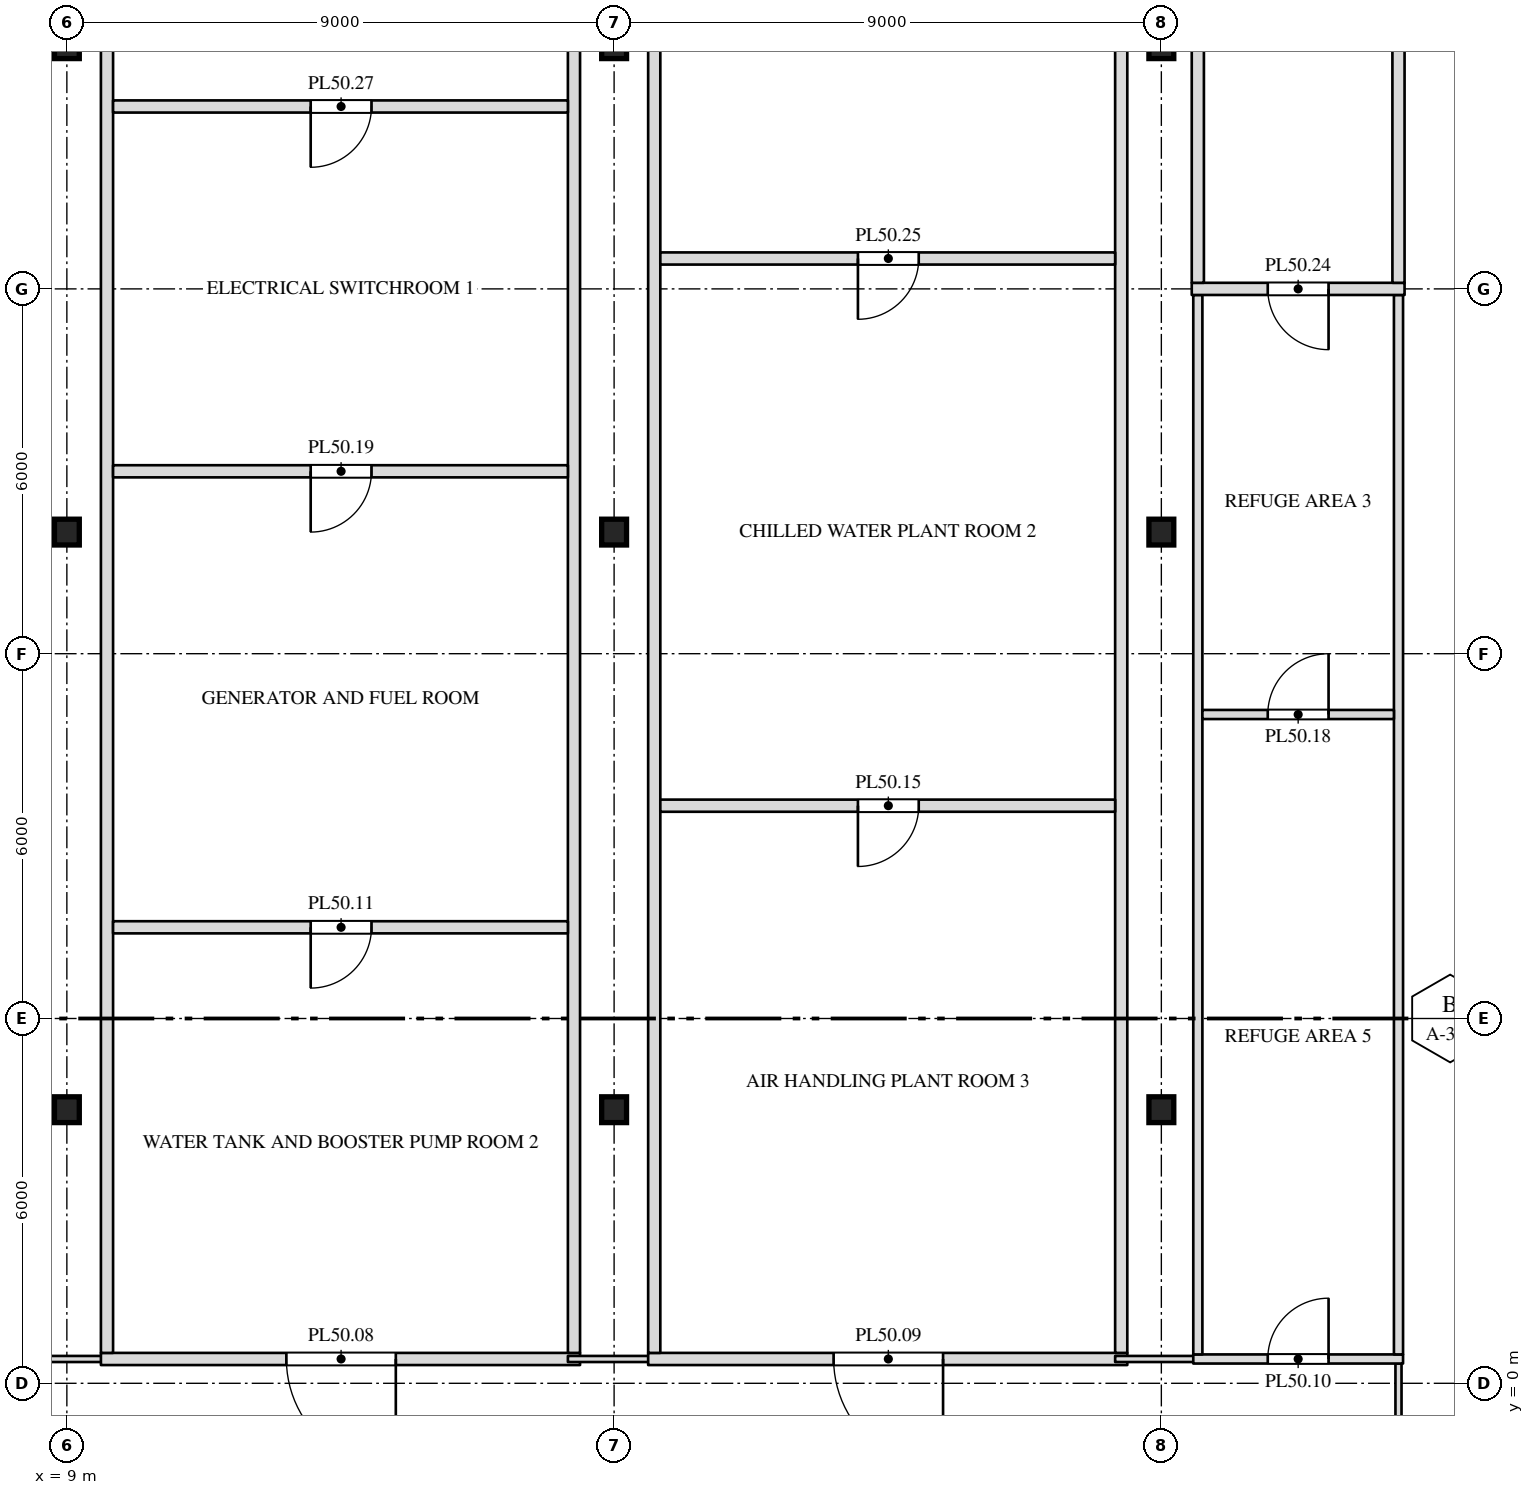
"""IFC4 building model, lengths in metres.
Left out: names, types, materials, properties, quantities, classifications, styles, units other than length and angle.
Written with IfcOpenShell. Run it as: python <this file> out.ifc"""

import sys

from ifc_helpers import new_model, si_unit, direction, frame, frame_2d, origin, origin_2d, place, context, subcontext, project, spatial, rectangle, i_section, extrude, element, fill, save


model = new_model("IFC4")
c1 = context("Model", 3, precision=1e-05, world=origin(), true_north=direction((0.0, 1.0)))
c2 = subcontext(c1, "Body", "Model", "MODEL_VIEW")
j1 = project(units=[si_unit("LENGTHUNIT", "METRE"), si_unit("PLANEANGLEUNIT", "RADIAN")], contexts=[c1])
p1 = place(None, origin())
s1 = spatial("IfcSite", under=j1, at=p1, CompositionType="ELEMENT")
p2 = place(p1, origin())
s2 = spatial("IfcBuilding", under=s1, at=p2, CompositionType="ELEMENT")
p3 = place(p2, frame((0.0, 0.0, 216.5)))
s3 = spatial("IfcBuildingStorey", under=s2, at=p3, CompositionType="ELEMENT", Elevation=216.5)
for number, where, z_axis, x_axis in (
    (1, (9.0, 4.5, 0.0), (0.0, 0.0, 1.0), (1.0, 0.0, 0.0)),
    (2, (18.0, 4.5, 0.0), (0.0, 0.0, 1.0), (1.0, 0.0, 0.0)),
    (3, (27.0, 4.5, 0.0), (0.0, 0.0, 1.0), (1.0, 0.0, 0.0)),
    (4, (9.0, 14.0, 0.0), (0.0, 0.0, 1.0), (1.0, 0.0, 0.0)),
    (5, (18.0, 14.0, 0.0), (0.0, 0.0, 1.0), (1.0, 0.0, 0.0)),
    (6, (27.0, 14.0, 0.0), (0.0, 0.0, 1.0), (1.0, 0.0, 0.0)),
    (7, (9.0, 22.0, 0.0), (0.0, 0.0, 1.0), (1.0, 0.0, 0.0)),
    (8, (18.0, 22.0, 0.0), (0.0, 0.0, 1.0), (1.0, 0.0, 0.0)),
    (9, (27.0, 22.0, 0.0), (0.0, 0.0, 1.0), (1.0, 0.0, 0.0)),
):
    element("IfcColumn", number, at=place(p3, frame(where, z_axis=z_axis, x_axis=x_axis)), inside=s3, PredefinedType="COLUMN", context=c2, shape_type="SweptSolid", body=[
        extrude(i_section(OverallWidth=0.409, OverallDepth=0.424, WebThickness=0.033, FlangeThickness=0.052, at=origin_2d()), origin(), (0.0, 0.0, 1.0), 4.0),
    ])
p4 = place(p3, frame((30.9, -1.925, 0.0), z_axis=(0.0, 0.0, 1.0), x_axis=(0.0, 1.0, 0.0)))
e10 = element("IfcWall", 10, at=p4, inside=s3, PredefinedType="PARTITIONING", context=c2, shape_type="SweptSolid", body=[
    extrude(rectangle(XDim=2.25, YDim=0.1, at=frame_2d((1.125, 0.0))), origin(), (0.0, 0.0, 1.0), 3.8),
])
p5 = place(p3, frame((8.24, 0.4, 0.0), z_axis=(0.0, 0.0, 1.0), x_axis=(1.0, 0.0, 0.0)))
e11 = element("IfcWall", 11, at=p5, inside=s3, PredefinedType="PARTITIONING", context=c2, shape_type="SweptSolid", body=[
    extrude(rectangle(XDim=1.52, YDim=0.1, at=frame_2d((0.76, 0.0))), origin(), (0.0, 0.0, 1.0), 3.8),
])
p6 = place(p3, frame((9.56, 0.4, 0.0), z_axis=(0.0, 0.0, 1.0), x_axis=(1.0, 0.0, 0.0)))
e12 = element("IfcWall", 12, at=p6, inside=s3, PredefinedType="PARTITIONING", context=c2, shape_type="SweptSolid", body=[
    extrude(rectangle(XDim=7.88, YDim=0.2, at=frame_2d((3.94, 0.0))), origin(), (0.0, 0.0, 1.0), 3.8),
])
p7 = place(p6, frame((3.05, 0.0, 0.0)))
e13 = element("IfcOpeningElement", 13, at=p7, cuts=e12, PredefinedType="OPENING", context=c2, shape_type="SweptSolid", body=[
    extrude(rectangle(XDim=1.8, YDim=2.1, at=frame_2d((0.9, 1.05))), frame((0.0, 0.112, 0.0), z_axis=(0.0, -1.0, 0.0), x_axis=(1.0, 0.0, 0.0)), (0.0, 0.0, 1.0), 0.224),
])
p8 = place(p3, frame((9.66, 0.5, 0.0), z_axis=(0.0, 0.0, 1.0), x_axis=(0.0, 1.0, 0.0)))
e14 = element("IfcWall", 14, at=p8, inside=s3, PredefinedType="PARTITIONING", context=c2, shape_type="SweptSolid", body=[
    extrude(rectangle(XDim=28.5, YDim=0.2, at=frame_2d((14.25, 0.0))), origin(), (0.0, 0.0, 1.0), 3.8),
])
p9 = place(p3, frame((17.24, 0.4, 0.0), z_axis=(0.0, 0.0, 1.0), x_axis=(1.0, 0.0, 0.0)))
e15 = element("IfcWall", 15, at=p9, inside=s3, PredefinedType="PARTITIONING", context=c2, shape_type="SweptSolid", body=[
    extrude(rectangle(XDim=1.52, YDim=0.1, at=frame_2d((0.76, 0.0))), origin(), (0.0, 0.0, 1.0), 3.8),
])
p10 = place(p3, frame((17.34, 0.5, 0.0), z_axis=(0.0, 0.0, 1.0), x_axis=(0.0, 1.0, 0.0)))
e16 = element("IfcWall", 16, at=p10, inside=s3, PredefinedType="PARTITIONING", context=c2, shape_type="SweptSolid", body=[
    extrude(rectangle(XDim=28.496, YDim=0.2, at=frame_2d((14.248, 0.0))), origin(), (0.0, 0.0, 1.0), 3.8),
])
p11 = place(p3, frame((18.56, 0.4, 0.0), z_axis=(0.0, 0.0, 1.0), x_axis=(1.0, 0.0, 0.0)))
e17 = element("IfcWall", 17, at=p11, inside=s3, PredefinedType="PARTITIONING", context=c2, shape_type="SweptSolid", body=[
    extrude(rectangle(XDim=7.88, YDim=0.2, at=frame_2d((3.94, 0.0))), origin(), (0.0, 0.0, 1.0), 3.8),
])
p12 = place(p11, frame((3.05, 0.0, 0.0)))
e18 = element("IfcOpeningElement", 18, at=p12, cuts=e17, PredefinedType="OPENING", context=c2, shape_type="SweptSolid", body=[
    extrude(rectangle(XDim=1.8, YDim=2.1, at=frame_2d((0.9, 1.05))), frame((0.0, 0.112, 0.0), z_axis=(0.0, -1.0, 0.0), x_axis=(1.0, 0.0, 0.0)), (0.0, 0.0, 1.0), 0.224),
])
p13 = place(p3, frame((18.66, 0.5, 0.0), z_axis=(0.0, 0.0, 1.0), x_axis=(0.0, 1.0, 0.0)))
e19 = element("IfcWall", 19, at=p13, inside=s3, PredefinedType="PARTITIONING", context=c2, shape_type="SweptSolid", body=[
    extrude(rectangle(XDim=28.496, YDim=0.2, at=frame_2d((14.248, 0.0))), origin(), (0.0, 0.0, 1.0), 3.8),
])
p14 = place(p3, frame((26.24, 0.4, 0.0), z_axis=(0.0, 0.0, 1.0), x_axis=(1.0, 0.0, 0.0)))
e20 = element("IfcWall", 20, at=p14, inside=s3, PredefinedType="PARTITIONING", context=c2, shape_type="SweptSolid", body=[
    extrude(rectangle(XDim=1.435, YDim=0.1, at=frame_2d((0.718, 0.0))), origin(), (0.0, 0.0, 1.0), 3.8),
])
p15 = place(p3, frame((26.34, 0.5, 0.0), z_axis=(0.0, 0.0, 1.0), x_axis=(0.0, 1.0, 0.0)))
e21 = element("IfcWall", 21, at=p15, inside=s3, PredefinedType="PARTITIONING", context=c2, shape_type="SweptSolid", body=[
    extrude(rectangle(XDim=28.5, YDim=0.2, at=frame_2d((14.25, 0.0))), origin(), (0.0, 0.0, 1.0), 3.8),
])
p16 = place(p3, frame((27.525, 0.4, 0.0), z_axis=(0.0, 0.0, 1.0), x_axis=(1.0, 0.0, 0.0)))
e22 = element("IfcWall", 22, at=p16, inside=s3, PredefinedType="PARTITIONING", context=c2, shape_type="SweptSolid", body=[
    extrude(rectangle(XDim=3.45, YDim=0.15, at=frame_2d((1.725, 0.0))), origin(), (0.0, 0.0, 1.0), 3.8),
])
p17 = place(p16, frame((1.225, 0.0, 0.0)))
e23 = element("IfcOpeningElement", 23, at=p17, cuts=e22, PredefinedType="OPENING", context=c2, shape_type="SweptSolid", body=[
    extrude(rectangle(XDim=1.0, YDim=2.1, at=frame_2d((0.5, 1.05))), frame((0.0, 0.087, 0.0), z_axis=(0.0, -1.0, 0.0), x_axis=(1.0, 0.0, 0.0)), (0.0, 0.0, 1.0), 0.174),
])
for number, where, z_axis, x_axis in (
    (24, (27.6, 0.475, 0.0), (0.0, 0.0, 1.0), (0.0, 1.0, 0.0)),
    (25, (30.9, 0.475, 0.0), (0.0, 0.0, 1.0), (0.0, 1.0, 0.0)),
):
    element("IfcWall", number, at=place(p3, frame(where, z_axis=z_axis, x_axis=x_axis)), inside=s3, PredefinedType="PARTITIONING", context=c2, shape_type="SweptSolid", body=[
        extrude(rectangle(XDim=17.425, YDim=0.15, at=frame_2d((8.712, 0.0))), origin(), (0.0, 0.0, 1.0), 3.8),
    ])
p18 = place(p3, frame((9.76, 7.5, 0.0), z_axis=(0.0, 0.0, 1.0), x_axis=(1.0, 0.0, 0.0)))
e26 = element("IfcWall", 26, at=p18, inside=s3, PredefinedType="PARTITIONING", context=c2, shape_type="SweptSolid", body=[
    extrude(rectangle(XDim=7.48, YDim=0.2, at=frame_2d((3.74, 0.0))), origin(), (0.0, 0.0, 1.0), 3.8),
])
p19 = place(p18, frame((3.25, 0.0, 0.0)))
e27 = element("IfcOpeningElement", 27, at=p19, cuts=e26, PredefinedType="OPENING", context=c2, shape_type="SweptSolid", body=[
    extrude(rectangle(XDim=1.0, YDim=2.1, at=frame_2d((0.5, 1.05))), frame((0.0, 0.112, 0.0), z_axis=(0.0, -1.0, 0.0), x_axis=(1.0, 0.0, 0.0)), (0.0, 0.0, 1.0), 0.224),
])
p20 = place(p3, frame((18.76, 9.5, 0.0), z_axis=(0.0, 0.0, 1.0), x_axis=(1.0, 0.0, 0.0)))
e28 = element("IfcWall", 28, at=p20, inside=s3, PredefinedType="PARTITIONING", context=c2, shape_type="SweptSolid", body=[
    extrude(rectangle(XDim=7.48, YDim=0.2, at=frame_2d((3.74, 0.0))), origin(), (0.0, 0.0, 1.0), 3.8),
])
p21 = place(p20, frame((3.25, 0.0, 0.0)))
e29 = element("IfcOpeningElement", 29, at=p21, cuts=e28, PredefinedType="OPENING", context=c2, shape_type="SweptSolid", body=[
    extrude(rectangle(XDim=1.0, YDim=2.1, at=frame_2d((0.5, 1.05))), frame((0.0, 0.112, 0.0), z_axis=(0.0, -1.0, 0.0), x_axis=(1.0, 0.0, 0.0)), (0.0, 0.0, 1.0), 0.224),
])
p22 = place(p3, frame((27.675, 11.0, 0.0), z_axis=(0.0, 0.0, 1.0), x_axis=(1.0, 0.0, 0.0)))
e30 = element("IfcWall", 30, at=p22, inside=s3, PredefinedType="PARTITIONING", context=c2, shape_type="SweptSolid", body=[
    extrude(rectangle(XDim=3.15, YDim=0.15, at=frame_2d((1.575, 0.0))), origin(), (0.0, 0.0, 1.0), 3.8),
])
p23 = place(p22, frame((1.075, 0.0, 0.0)))
e31 = element("IfcOpeningElement", 31, at=p23, cuts=e30, PredefinedType="OPENING", context=c2, shape_type="SweptSolid", body=[
    extrude(rectangle(XDim=1.0, YDim=2.1, at=frame_2d((0.5, 1.05))), frame((0.0, 0.087, 0.0), z_axis=(0.0, -1.0, 0.0), x_axis=(1.0, 0.0, 0.0)), (0.0, 0.0, 1.0), 0.174),
])
p24 = place(p3, frame((9.76, 15.0, 0.0), z_axis=(0.0, 0.0, 1.0), x_axis=(1.0, 0.0, 0.0)))
e32 = element("IfcWall", 32, at=p24, inside=s3, PredefinedType="PARTITIONING", context=c2, shape_type="SweptSolid", body=[
    extrude(rectangle(XDim=7.48, YDim=0.2, at=frame_2d((3.74, 0.0))), origin(), (0.0, 0.0, 1.0), 3.8),
])
p25 = place(p24, frame((3.25, 0.0, 0.0)))
e33 = element("IfcOpeningElement", 33, at=p25, cuts=e32, PredefinedType="OPENING", context=c2, shape_type="SweptSolid", body=[
    extrude(rectangle(XDim=1.0, YDim=2.1, at=frame_2d((0.5, 1.05))), frame((0.0, 0.112, 0.0), z_axis=(0.0, -1.0, 0.0), x_axis=(1.0, 0.0, 0.0)), (0.0, 0.0, 1.0), 0.224),
])
p26 = place(p3, frame((27.5, 18.0, 0.0), z_axis=(0.0, 0.0, 1.0), x_axis=(1.0, 0.0, 0.0)))
e34 = element("IfcWall", 34, at=p26, inside=s3, PredefinedType="PARTITIONING", context=c2, shape_type="SweptSolid", body=[
    extrude(rectangle(XDim=3.5, YDim=0.2, at=frame_2d((1.75, 0.0))), origin(), (0.0, 0.0, 1.0), 3.2),
])
p27 = place(p26, frame((1.25, 0.0, 0.0)))
e35 = element("IfcOpeningElement", 35, at=p27, cuts=e34, PredefinedType="OPENING", context=c2, shape_type="SweptSolid", body=[
    extrude(rectangle(XDim=1.0, YDim=2.1, at=frame_2d((0.5, 1.05))), frame((0.0, 0.112, 0.0), z_axis=(0.0, -1.0, 0.0), x_axis=(1.0, 0.0, 0.0)), (0.0, 0.0, 1.0), 0.224),
])
p28 = place(p3, frame((27.6, 18.1, 0.0), z_axis=(0.0, 0.0, 1.0), x_axis=(0.0, 1.0, 0.0)))
e36 = element("IfcWall", 36, at=p28, inside=s3, PredefinedType="PARTITIONING", context=c2, shape_type="SweptSolid", body=[
    extrude(rectangle(XDim=10.88, YDim=0.2, at=frame_2d((5.44, 0.0))), origin(), (0.0, 0.0, 1.0), 3.8),
])
p29 = place(p3, frame((30.9, 18.1, 0.0), z_axis=(0.0, 0.0, 1.0), x_axis=(0.0, 1.0, 0.0)))
e37 = element("IfcWall", 37, at=p29, inside=s3, PredefinedType="PARTITIONING", context=c2, shape_type="SweptSolid", body=[
    extrude(rectangle(XDim=9.84, YDim=0.2, at=frame_2d((4.92, 0.0))), origin(), (0.0, 0.0, 1.0), 3.8),
])
p30 = place(p3, frame((18.76, 18.5, 0.0), z_axis=(0.0, 0.0, 1.0), x_axis=(1.0, 0.0, 0.0)))
e38 = element("IfcWall", 38, at=p30, inside=s3, PredefinedType="PARTITIONING", context=c2, shape_type="SweptSolid", body=[
    extrude(rectangle(XDim=7.48, YDim=0.2, at=frame_2d((3.74, 0.0))), origin(), (0.0, 0.0, 1.0), 3.8),
])
p31 = place(p30, frame((3.25, 0.0, 0.0)))
e39 = element("IfcOpeningElement", 39, at=p31, cuts=e38, PredefinedType="OPENING", context=c2, shape_type="SweptSolid", body=[
    extrude(rectangle(XDim=1.0, YDim=2.1, at=frame_2d((0.5, 1.05))), frame((0.0, 0.112, 0.0), z_axis=(0.0, -1.0, 0.0), x_axis=(1.0, 0.0, 0.0)), (0.0, 0.0, 1.0), 0.224),
])
p32 = place(p3, frame((9.76, 21.0, 0.0), z_axis=(0.0, 0.0, 1.0), x_axis=(1.0, 0.0, 0.0)))
e40 = element("IfcWall", 40, at=p32, inside=s3, PredefinedType="PARTITIONING", context=c2, shape_type="SweptSolid", body=[
    extrude(rectangle(XDim=7.48, YDim=0.2, at=frame_2d((3.74, 0.0))), origin(), (0.0, 0.0, 1.0), 3.8),
])
p33 = place(p32, frame((3.25, 0.0, 0.0)))
e41 = element("IfcOpeningElement", 41, at=p33, cuts=e40, PredefinedType="OPENING", context=c2, shape_type="SweptSolid", body=[
    extrude(rectangle(XDim=1.0, YDim=2.1, at=frame_2d((0.5, 1.05))), frame((0.0, 0.112, 0.0), z_axis=(0.0, -1.0, 0.0), x_axis=(1.0, 0.0, 0.0)), (0.0, 0.0, 1.0), 0.224),
])
p34 = place(p7, origin())
e42 = element("IfcDoor", 42, at=p34, inside=s3, OperationType="DOUBLE_DOOR_SINGLE_SWING", PredefinedType="DOOR", context=c2, shape_type="SweptSolid", body=[
    extrude(rectangle(XDim=1.8, YDim=2.1, at=frame_2d((0.9, 1.05))), frame((0.0, 0.025, 0.0), z_axis=(0.0, -1.0, 0.0), x_axis=(1.0, 0.0, 0.0)), (0.0, 0.0, 1.0), 0.05),
])
fill(e13, e42)
p35 = place(p12, origin())
e43 = element("IfcDoor", 43, at=p35, inside=s3, OperationType="DOUBLE_DOOR_SINGLE_SWING", PredefinedType="DOOR", context=c2, shape_type="SweptSolid", body=[
    extrude(rectangle(XDim=1.8, YDim=2.1, at=frame_2d((0.9, 1.05))), frame((0.0, 0.025, 0.0), z_axis=(0.0, -1.0, 0.0), x_axis=(1.0, 0.0, 0.0)), (0.0, 0.0, 1.0), 0.05),
])
fill(e18, e43)
p36 = place(p17, origin())
e44 = element("IfcDoor", 44, at=p36, inside=s3, OperationType="SINGLE_SWING_RIGHT", PredefinedType="DOOR", context=c2, shape_type="SweptSolid", body=[
    extrude(rectangle(XDim=1.0, YDim=2.1, at=frame_2d((0.5, 1.05))), frame((0.0, 0.025, 0.0), z_axis=(0.0, -1.0, 0.0), x_axis=(1.0, 0.0, 0.0)), (0.0, 0.0, 1.0), 0.05),
])
fill(e23, e44)
p37 = place(p19, origin())
e45 = element("IfcDoor", 45, at=p37, inside=s3, OperationType="SINGLE_SWING_RIGHT", PredefinedType="DOOR", context=c2, shape_type="SweptSolid", body=[
    extrude(rectangle(XDim=1.0, YDim=2.1, at=frame_2d((0.5, 1.05))), frame((0.0, 0.025, 0.0), z_axis=(0.0, -1.0, 0.0), x_axis=(1.0, 0.0, 0.0)), (0.0, 0.0, 1.0), 0.05),
])
fill(e27, e45)
p38 = place(p21, origin())
e46 = element("IfcDoor", 46, at=p38, inside=s3, OperationType="SINGLE_SWING_RIGHT", PredefinedType="DOOR", context=c2, shape_type="SweptSolid", body=[
    extrude(rectangle(XDim=1.0, YDim=2.1, at=frame_2d((0.5, 1.05))), frame((0.0, 0.025, 0.0), z_axis=(0.0, -1.0, 0.0), x_axis=(1.0, 0.0, 0.0)), (0.0, 0.0, 1.0), 0.05),
])
fill(e29, e46)
p39 = place(p23, origin())
e47 = element("IfcDoor", 47, at=p39, inside=s3, OperationType="SINGLE_SWING_RIGHT", PredefinedType="DOOR", context=c2, shape_type="SweptSolid", body=[
    extrude(rectangle(XDim=1.0, YDim=2.1, at=frame_2d((0.5, 1.05))), frame((0.0, 0.025, 0.0), z_axis=(0.0, -1.0, 0.0), x_axis=(1.0, 0.0, 0.0)), (0.0, 0.0, 1.0), 0.05),
])
fill(e31, e47)
p40 = place(p25, origin())
e48 = element("IfcDoor", 48, at=p40, inside=s3, OperationType="SINGLE_SWING_RIGHT", PredefinedType="DOOR", context=c2, shape_type="SweptSolid", body=[
    extrude(rectangle(XDim=1.0, YDim=2.1, at=frame_2d((0.5, 1.05))), frame((0.0, 0.025, 0.0), z_axis=(0.0, -1.0, 0.0), x_axis=(1.0, 0.0, 0.0)), (0.0, 0.0, 1.0), 0.05),
])
fill(e33, e48)
p41 = place(p27, origin())
e49 = element("IfcDoor", 49, at=p41, inside=s3, OperationType="SINGLE_SWING_LEFT", PredefinedType="DOOR", context=c2, shape_type="SweptSolid", body=[
    extrude(rectangle(XDim=1.0, YDim=2.1, at=frame_2d((0.5, 1.05))), frame((0.0, 0.025, 0.0), z_axis=(0.0, -1.0, 0.0), x_axis=(1.0, 0.0, 0.0)), (0.0, 0.0, 1.0), 0.05),
])
fill(e35, e49)
p42 = place(p31, origin())
e50 = element("IfcDoor", 50, at=p42, inside=s3, OperationType="SINGLE_SWING_RIGHT", PredefinedType="DOOR", context=c2, shape_type="SweptSolid", body=[
    extrude(rectangle(XDim=1.0, YDim=2.1, at=frame_2d((0.5, 1.05))), frame((0.0, 0.025, 0.0), z_axis=(0.0, -1.0, 0.0), x_axis=(1.0, 0.0, 0.0)), (0.0, 0.0, 1.0), 0.05),
])
fill(e39, e50)
p43 = place(p33, origin())
e51 = element("IfcDoor", 51, at=p43, inside=s3, OperationType="SINGLE_SWING_RIGHT", PredefinedType="DOOR", context=c2, shape_type="SweptSolid", body=[
    extrude(rectangle(XDim=1.0, YDim=2.1, at=frame_2d((0.5, 1.05))), frame((0.0, 0.025, 0.0), z_axis=(0.0, -1.0, 0.0), x_axis=(1.0, 0.0, 0.0)), (0.0, 0.0, 1.0), 0.05),
])
fill(e41, e51)
save(model, sys.argv[1])
